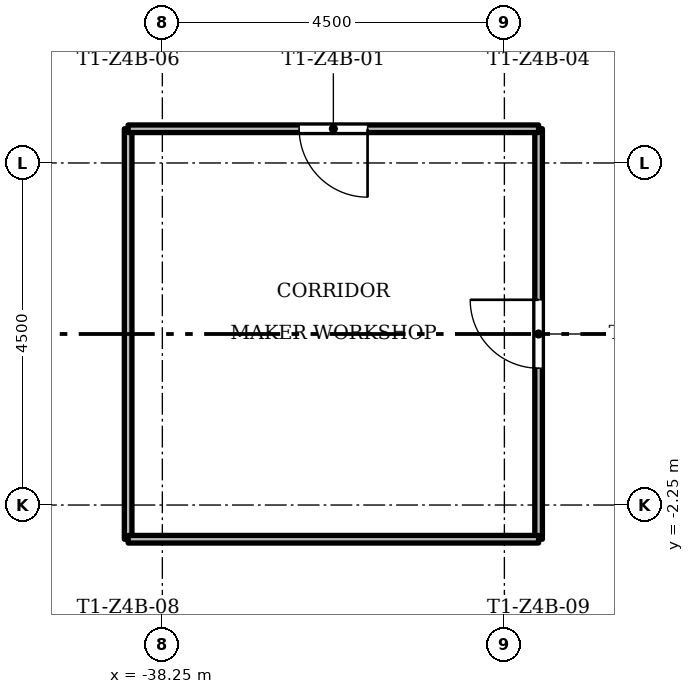
"""IFC4 building model, lengths in metres.
Left out: names, types, materials, properties, quantities, classifications, styles, units other than length and angle.
Written with IfcOpenShell. Run it as: python <this file> out.ifc"""

import sys

from ifc_helpers import new_model, si_unit, direction, frame, frame_2d, origin, place, context, subcontext, project, spatial, rectangle, extrude, element, fill, save


model = new_model("IFC4")
c1 = context("Model", 3, precision=1e-05, world=origin(), true_north=direction((0.0, 1.0)))
c2 = subcontext(c1, "Body", "Model", "MODEL_VIEW")
j1 = project(units=[si_unit("LENGTHUNIT", "METRE"), si_unit("PLANEANGLEUNIT", "RADIAN")], contexts=[c1])
p1 = place(None, origin())
s1 = spatial("IfcSite", under=j1, at=p1, CompositionType="ELEMENT")
p2 = place(p1, origin())
s2 = spatial("IfcBuilding", under=s1, at=p2, CompositionType="ELEMENT")
p3 = place(p2, frame((0.0, 0.0, 230.0)))
s3 = spatial("IfcBuildingStorey", under=s2, at=p3, CompositionType="ELEMENT", Elevation=230.0)
p4 = place(p3, frame((-38.7, -2.7, 0.0), z_axis=(0.0, 0.0, 1.0), x_axis=(0.0, 1.0, 0.0)))
e1 = element("IfcWall", 1, at=p4, inside=s3, PredefinedType="PARTITIONING", context=c2, shape_type="SweptSolid", body=[
    extrude(rectangle(XDim=5.4, YDim=0.1, at=frame_2d((2.7, 0.0))), origin(), (0.0, 0.0, 1.0), 2.98),
])
p5 = place(p3, frame((-33.3, -2.7, 0.0), z_axis=(0.0, 0.0, 1.0), x_axis=(0.0, 1.0, 0.0)))
e2 = element("IfcWall", 2, at=p5, inside=s3, PredefinedType="PARTITIONING", context=c2, shape_type="SweptSolid", body=[
    extrude(rectangle(XDim=5.4, YDim=0.1, at=frame_2d((2.7, 0.0))), origin(), (0.0, 0.0, 1.0), 2.98),
])
p6 = place(p5, frame((2.25, 0.0, 0.0)))
e3 = element("IfcOpeningElement", 3, at=p6, cuts=e2, PredefinedType="OPENING", context=c2, shape_type="SweptSolid", body=[
    extrude(rectangle(XDim=0.9, YDim=2.1, at=frame_2d((0.45, 1.05))), frame((0.0, 0.06, 0.0), z_axis=(0.0, -1.0, 0.0), x_axis=(1.0, 0.0, 0.0)), (0.0, 0.0, 1.0), 0.12),
])
p7 = place(p3, frame((-38.7, -2.7, 0.0), z_axis=(0.0, 0.0, 1.0), x_axis=(1.0, 0.0, 0.0)))
e4 = element("IfcWall", 4, at=p7, inside=s3, PredefinedType="PARTITIONING", context=c2, shape_type="SweptSolid", body=[
    extrude(rectangle(XDim=5.4, YDim=0.1, at=frame_2d((2.7, 0.0))), origin(), (0.0, 0.0, 1.0), 2.98),
])
p8 = place(p3, frame((-38.7, 2.7, 0.0), z_axis=(0.0, 0.0, 1.0), x_axis=(1.0, 0.0, 0.0)))
e5 = element("IfcWall", 5, at=p8, inside=s3, PredefinedType="PARTITIONING", context=c2, shape_type="SweptSolid", body=[
    extrude(rectangle(XDim=5.4, YDim=0.1, at=frame_2d((2.7, 0.0))), origin(), (0.0, 0.0, 1.0), 2.98),
])
p9 = place(p8, frame((2.25, 0.0, 0.0)))
e6 = element("IfcOpeningElement", 6, at=p9, cuts=e5, PredefinedType="OPENING", context=c2, shape_type="SweptSolid", body=[
    extrude(rectangle(XDim=0.9, YDim=2.1, at=frame_2d((0.45, 1.05))), frame((0.0, 0.06, 0.0), z_axis=(0.0, -1.0, 0.0), x_axis=(1.0, 0.0, 0.0)), (0.0, 0.0, 1.0), 0.12),
])
p10 = place(p9, origin())
e7 = element("IfcDoor", 7, at=p10, inside=s3, OperationType="SINGLE_SWING_RIGHT", PredefinedType="DOOR", context=c2, shape_type="SweptSolid", body=[
    extrude(rectangle(XDim=0.9, YDim=2.1, at=frame_2d((0.45, 1.05))), frame((0.0, 0.025, 0.0), z_axis=(0.0, -1.0, 0.0), x_axis=(1.0, 0.0, 0.0)), (0.0, 0.0, 1.0), 0.05),
])
fill(e6, e7)
p11 = place(p6, origin())
e8 = element("IfcDoor", 8, at=p11, inside=s3, OperationType="SINGLE_SWING_LEFT", PredefinedType="DOOR", context=c2, shape_type="SweptSolid", body=[
    extrude(rectangle(XDim=0.9, YDim=2.1, at=frame_2d((0.45, 1.05))), frame((0.0, 0.025, 0.0), z_axis=(0.0, -1.0, 0.0), x_axis=(1.0, 0.0, 0.0)), (0.0, 0.0, 1.0), 0.05),
])
fill(e3, e8)
save(model, sys.argv[1])
